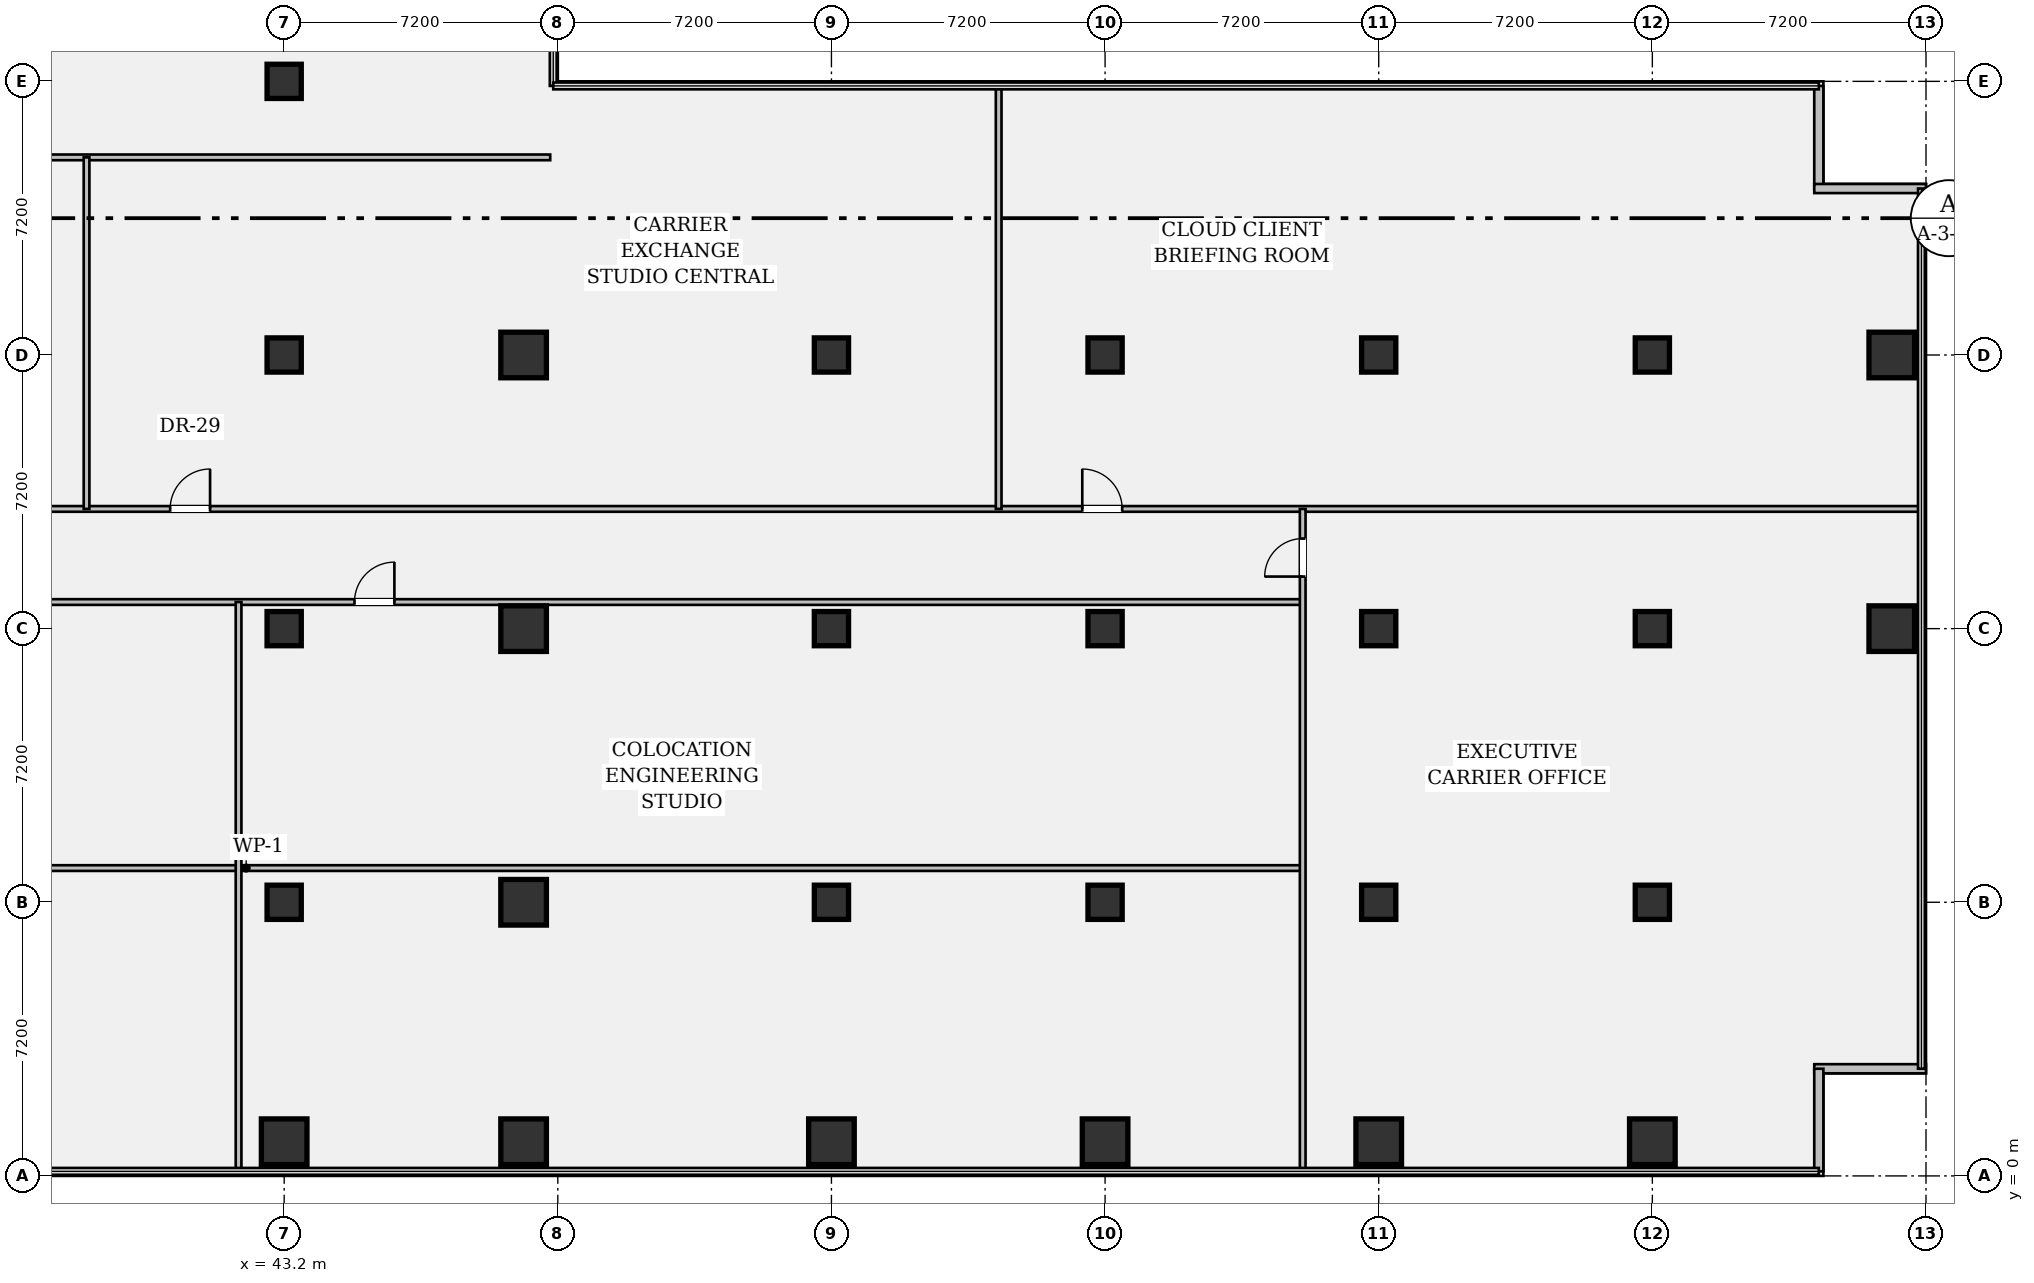
"""IFC4 building model, lengths in metres.
Left out: names, types, materials, properties, quantities, classifications, styles, units other than length and angle.
Written with IfcOpenShell. Run it as: python <this file> out.ifc"""

import sys

from ifc_helpers import new_model, si_unit, direction, frame, frame_2d, origin, origin_2d, place, context, subcontext, project, spatial, rectangle, hollow_rectangle, extrude, element, fill, save


model = new_model("IFC4")
c1 = context("Model", 3, precision=1e-05, world=origin(), true_north=direction((0.0, 1.0)))
c2 = subcontext(c1, "Body", "Model", "MODEL_VIEW")
j1 = project(units=[si_unit("LENGTHUNIT", "METRE"), si_unit("PLANEANGLEUNIT", "RADIAN")], contexts=[c1])
p1 = place(None, origin())
s1 = spatial("IfcSite", under=j1, at=p1, CompositionType="ELEMENT")
p2 = place(p1, origin())
s2 = spatial("IfcBuilding", under=s1, at=p2, CompositionType="ELEMENT")
p3 = place(p2, frame((0.0, 0.0, 13.65)))
s3 = spatial("IfcBuildingStorey", under=s2, at=p3, CompositionType="ELEMENT", Elevation=13.65)
p4 = place(p3, frame((43.2, 0.9, 0.0), z_axis=(0.0, 0.0, 1.0), x_axis=(1.0, 0.0, 0.0)))
e1 = element("IfcColumn", 1, at=p4, inside=s3, PredefinedType="COLUMN", context=c2, shape_type="SweptSolid", body=[
    extrude(hollow_rectangle(XDim=1.2, YDim=1.2, WallThickness=0.075, at=origin_2d()), origin(), (0.0, 0.0, 1.0), 3.91),
])
for number, where, z_axis, x_axis in (
    (2, (43.2, 7.2, 0.0), (0.0, 0.0, 1.0), (1.0, 0.0, 0.0)),
    (3, (43.2, 14.4, 0.0), (0.0, 0.0, 1.0), (1.0, 0.0, 0.0)),
    (4, (43.2, 21.6, 0.0), (0.0, 0.0, 1.0), (1.0, 0.0, 0.0)),
    (5, (43.2, 28.8, 0.0), (0.0, 0.0, 1.0), (1.0, 0.0, 0.0)),
):
    element("IfcColumn", number, at=place(p3, frame(where, z_axis=z_axis, x_axis=x_axis)), inside=s3, PredefinedType="COLUMN", context=c2, shape_type="SweptSolid", body=[
        extrude(rectangle(XDim=0.9, YDim=0.9, at=origin_2d()), origin(), (0.0, 0.0, 1.0), 3.91),
    ])
for number, where, z_axis, x_axis in (
    (6, (49.5, 0.9, 0.0), (0.0, 0.0, 1.0), (1.0, 0.0, 0.0)),
    (7, (49.5, 7.2, 0.0), (0.0, 0.0, 1.0), (1.0, 0.0, 0.0)),
    (8, (49.5, 14.4, 0.0), (0.0, 0.0, 1.0), (1.0, 0.0, 0.0)),
    (9, (49.5, 21.6, 0.0), (0.0, 0.0, 1.0), (1.0, 0.0, 0.0)),
    (10, (57.6, 0.9, 0.0), (0.0, 0.0, 1.0), (1.0, 0.0, 0.0)),
):
    element("IfcColumn", number, at=place(p3, frame(where, z_axis=z_axis, x_axis=x_axis)), inside=s3, PredefinedType="COLUMN", context=c2, shape_type="SweptSolid", body=[
        extrude(hollow_rectangle(XDim=1.2, YDim=1.2, WallThickness=0.075, at=origin_2d()), origin(), (0.0, 0.0, 1.0), 3.91),
    ])
for number, where, z_axis, x_axis in (
    (11, (57.6, 7.2, 0.0), (0.0, 0.0, 1.0), (1.0, 0.0, 0.0)),
    (12, (57.6, 14.4, 0.0), (0.0, 0.0, 1.0), (1.0, 0.0, 0.0)),
    (13, (57.6, 21.6, 0.0), (0.0, 0.0, 1.0), (1.0, 0.0, 0.0)),
):
    element("IfcColumn", number, at=place(p3, frame(where, z_axis=z_axis, x_axis=x_axis)), inside=s3, PredefinedType="COLUMN", context=c2, shape_type="SweptSolid", body=[
        extrude(rectangle(XDim=0.9, YDim=0.9, at=origin_2d()), origin(), (0.0, 0.0, 1.0), 3.91),
    ])
p5 = place(p3, frame((64.8, 0.9, 0.0), z_axis=(0.0, 0.0, 1.0), x_axis=(1.0, 0.0, 0.0)))
e14 = element("IfcColumn", 14, at=p5, inside=s3, PredefinedType="COLUMN", context=c2, shape_type="SweptSolid", body=[
    extrude(hollow_rectangle(XDim=1.2, YDim=1.2, WallThickness=0.075, at=origin_2d()), origin(), (0.0, 0.0, 1.0), 3.91),
])
for number, where, z_axis, x_axis in (
    (15, (64.8, 7.2, 0.0), (0.0, 0.0, 1.0), (1.0, 0.0, 0.0)),
    (16, (64.8, 14.4, 0.0), (0.0, 0.0, 1.0), (1.0, 0.0, 0.0)),
    (17, (64.8, 21.6, 0.0), (0.0, 0.0, 1.0), (1.0, 0.0, 0.0)),
):
    element("IfcColumn", number, at=place(p3, frame(where, z_axis=z_axis, x_axis=x_axis)), inside=s3, PredefinedType="COLUMN", context=c2, shape_type="SweptSolid", body=[
        extrude(rectangle(XDim=0.9, YDim=0.9, at=origin_2d()), origin(), (0.0, 0.0, 1.0), 3.91),
    ])
p6 = place(p3, frame((72.0, 0.9, 0.0), z_axis=(0.0, 0.0, 1.0), x_axis=(1.0, 0.0, 0.0)))
e18 = element("IfcColumn", 18, at=p6, inside=s3, PredefinedType="COLUMN", context=c2, shape_type="SweptSolid", body=[
    extrude(hollow_rectangle(XDim=1.2, YDim=1.2, WallThickness=0.075, at=origin_2d()), origin(), (0.0, 0.0, 1.0), 3.91),
])
for number, where, z_axis, x_axis in (
    (19, (72.0, 7.2, 0.0), (0.0, 0.0, 1.0), (1.0, 0.0, 0.0)),
    (20, (72.0, 14.4, 0.0), (0.0, 0.0, 1.0), (1.0, 0.0, 0.0)),
    (21, (72.0, 21.6, 0.0), (0.0, 0.0, 1.0), (1.0, 0.0, 0.0)),
):
    element("IfcColumn", number, at=place(p3, frame(where, z_axis=z_axis, x_axis=x_axis)), inside=s3, PredefinedType="COLUMN", context=c2, shape_type="SweptSolid", body=[
        extrude(rectangle(XDim=0.9, YDim=0.9, at=origin_2d()), origin(), (0.0, 0.0, 1.0), 3.91),
    ])
p7 = place(p3, frame((79.2, 0.9, 0.0), z_axis=(0.0, 0.0, 1.0), x_axis=(1.0, 0.0, 0.0)))
e22 = element("IfcColumn", 22, at=p7, inside=s3, PredefinedType="COLUMN", context=c2, shape_type="SweptSolid", body=[
    extrude(hollow_rectangle(XDim=1.2, YDim=1.2, WallThickness=0.075, at=origin_2d()), origin(), (0.0, 0.0, 1.0), 3.91),
])
for number, where, z_axis, x_axis in (
    (23, (79.2, 7.2, 0.0), (0.0, 0.0, 1.0), (1.0, 0.0, 0.0)),
    (24, (79.2, 14.4, 0.0), (0.0, 0.0, 1.0), (1.0, 0.0, 0.0)),
    (25, (79.2, 21.6, 0.0), (0.0, 0.0, 1.0), (1.0, 0.0, 0.0)),
):
    element("IfcColumn", number, at=place(p3, frame(where, z_axis=z_axis, x_axis=x_axis)), inside=s3, PredefinedType="COLUMN", context=c2, shape_type="SweptSolid", body=[
        extrude(rectangle(XDim=0.9, YDim=0.9, at=origin_2d()), origin(), (0.0, 0.0, 1.0), 3.91),
    ])
for number, where, z_axis, x_axis in (
    (26, (85.5, 14.4, 0.0), (0.0, 0.0, 1.0), (1.0, 0.0, 0.0)),
    (27, (85.5, 21.6, 0.0), (0.0, 0.0, 1.0), (1.0, 0.0, 0.0)),
):
    element("IfcColumn", number, at=place(p3, frame(where, z_axis=z_axis, x_axis=x_axis)), inside=s3, PredefinedType="COLUMN", context=c2, shape_type="SweptSolid", body=[
        extrude(hollow_rectangle(XDim=1.2, YDim=1.2, WallThickness=0.075, at=origin_2d()), origin(), (0.0, 0.0, 1.0), 3.91),
    ])
p8 = place(p3, frame((83.58, 28.68, 0.0), z_axis=(0.0, 0.0, 1.0), x_axis=(0.0, -1.0, 0.0)))
e28 = element("IfcWall", 28, at=p8, inside=s3, PredefinedType="STANDARD", context=c2, shape_type="SweptSolid", body=[
    extrude(rectangle(XDim=2.7, YDim=0.24, at=frame_2d((1.35, 0.0))), origin(), (0.0, 0.0, 1.0), 3.91),
])
for number, where, z_axis, x_axis in (
    (29, (83.46, 25.98, 0.0), (0.0, 0.0, 1.0), (1.0, 0.0, 0.0)),
    (30, (86.4, 2.82, 0.0), (0.0, 0.0, 1.0), (-1.0, 0.0, 0.0)),
):
    element("IfcWall", number, at=place(p3, frame(where, z_axis=z_axis, x_axis=x_axis)), inside=s3, PredefinedType="STANDARD", context=c2, shape_type="SweptSolid", body=[
        extrude(rectangle(XDim=2.94, YDim=0.24, at=frame_2d((1.47, 0.0))), origin(), (0.0, 0.0, 1.0), 3.91),
    ])
p9 = place(p3, frame((83.58, 2.82, 0.0), z_axis=(0.0, 0.0, 1.0), x_axis=(0.0, -1.0, 0.0)))
e31 = element("IfcWall", 31, at=p9, inside=s3, PredefinedType="STANDARD", context=c2, shape_type="SweptSolid", body=[
    extrude(rectangle(XDim=2.7, YDim=0.24, at=frame_2d((1.35, 0.0))), origin(), (0.0, 0.0, 1.0), 3.91),
])
p10 = place(p3, frame((14.4, 8.1, 0.0), z_axis=(0.0, 0.0, 1.0), x_axis=(1.0, 0.0, 0.0)))
e32 = element("IfcWall", 32, at=p10, inside=s3, PredefinedType="PARTITIONING", context=c2, shape_type="SweptSolid", body=[
    extrude(rectangle(XDim=55.6, YDim=0.15, at=frame_2d((27.8, 0.0))), origin(), (0.0, 0.0, 1.0), 2.968),
])
p11 = place(p10, frame((1.1, 0.0, 0.0)))
e33 = element("IfcOpeningElement", 33, at=p11, cuts=e32, PredefinedType="OPENING", context=c2, shape_type="SweptSolid", body=[
    extrude(rectangle(XDim=1.0, YDim=2.15, at=frame_2d((0.5, 1.075))), frame((0.0, 0.087, 0.0), z_axis=(0.0, -1.0, 0.0), x_axis=(1.0, 0.0, 0.0)), (0.0, 0.0, 1.0), 0.174),
])
p12 = place(p3, frame((17.45, 15.1, 0.0), z_axis=(0.0, 0.0, 1.0), x_axis=(1.0, 0.0, 0.0)))
e34 = element("IfcWall", 34, at=p12, inside=s3, PredefinedType="PARTITIONING", context=c2, shape_type="SweptSolid", body=[
    extrude(rectangle(XDim=52.55, YDim=0.15, at=frame_2d((26.275, 0.0))), origin(), (0.0, 0.0, 1.0), 2.968),
])
p13 = place(p12, frame((5.2, 0.0, 0.0)))
e35 = element("IfcOpeningElement", 35, at=p13, cuts=e34, PredefinedType="OPENING", context=c2, shape_type="SweptSolid", body=[
    extrude(rectangle(XDim=1.05, YDim=2.15, at=frame_2d((0.525, 1.075))), frame((0.0, 0.087, 0.0), z_axis=(0.0, -1.0, 0.0), x_axis=(1.0, 0.0, 0.0)), (0.0, 0.0, 1.0), 0.174),
])
p14 = place(p12, frame((27.6, 0.0, 0.0)))
e36 = element("IfcOpeningElement", 36, at=p14, cuts=e34, PredefinedType="OPENING", context=c2, shape_type="SweptSolid", body=[
    extrude(rectangle(XDim=1.05, YDim=2.15, at=frame_2d((0.525, 1.075))), frame((0.0, 0.087, 0.0), z_axis=(0.0, -1.0, 0.0), x_axis=(1.0, 0.0, 0.0)), (0.0, 0.0, 1.0), 0.174),
])
p15 = place(p3, frame((17.45, 17.55, 0.0), z_axis=(0.0, 0.0, 1.0), x_axis=(1.0, 0.0, 0.0)))
e37 = element("IfcWall", 37, at=p15, inside=s3, PredefinedType="PARTITIONING", context=c2, shape_type="SweptSolid", body=[
    extrude(rectangle(XDim=68.83, YDim=0.15, at=frame_2d((34.415, 0.0))), origin(), (0.0, 0.0, 1.0), 2.968),
])
p16 = place(p15, frame((2.4, 0.0, 0.0)))
e38 = element("IfcOpeningElement", 38, at=p16, cuts=e37, PredefinedType="OPENING", context=c2, shape_type="SweptSolid", body=[
    extrude(rectangle(XDim=1.05, YDim=2.15, at=frame_2d((0.525, 1.075))), frame((0.0, 0.087, 0.0), z_axis=(0.0, -1.0, 0.0), x_axis=(1.0, 0.0, 0.0)), (0.0, 0.0, 1.0), 0.174),
])
p17 = place(p15, frame((22.75, 0.0, 0.0)))
e39 = element("IfcOpeningElement", 39, at=p17, cuts=e37, PredefinedType="OPENING", context=c2, shape_type="SweptSolid", body=[
    extrude(rectangle(XDim=1.05, YDim=2.15, at=frame_2d((0.525, 1.075))), frame((0.0, 0.087, 0.0), z_axis=(0.0, -1.0, 0.0), x_axis=(1.0, 0.0, 0.0)), (0.0, 0.0, 1.0), 0.174),
])
p18 = place(p15, frame((46.75, 0.0, 0.0)))
e40 = element("IfcOpeningElement", 40, at=p18, cuts=e37, PredefinedType="OPENING", context=c2, shape_type="SweptSolid", body=[
    extrude(rectangle(XDim=1.05, YDim=2.15, at=frame_2d((0.525, 1.075))), frame((0.0, 0.087, 0.0), z_axis=(0.0, -1.0, 0.0), x_axis=(1.0, 0.0, 0.0)), (0.0, 0.0, 1.0), 0.174),
])
p19 = place(p3, frame((70.0, 0.12, 0.0), z_axis=(0.0, 0.0, 1.0), x_axis=(0.0, 1.0, 0.0)))
e41 = element("IfcWall", 41, at=p19, inside=s3, PredefinedType="PARTITIONING", context=c2, shape_type="SweptSolid", body=[
    extrude(rectangle(XDim=17.43, YDim=0.15, at=frame_2d((8.715, 0.0))), origin(), (0.0, 0.0, 1.0), 2.968),
])
p20 = place(p19, frame((15.65, 0.0, 0.0)))
e42 = element("IfcOpeningElement", 42, at=p20, cuts=e41, PredefinedType="OPENING", context=c2, shape_type="SweptSolid", body=[
    extrude(rectangle(XDim=1.0, YDim=2.15, at=frame_2d((0.5, 1.075))), frame((0.0, 0.087, 0.0), z_axis=(0.0, -1.0, 0.0), x_axis=(1.0, 0.0, 0.0)), (0.0, 0.0, 1.0), 0.174),
])
p21 = place(p3, frame((17.45, 26.8, 0.0), z_axis=(0.0, 0.0, 1.0), x_axis=(1.0, 0.0, 0.0)))
e43 = element("IfcWall", 43, at=p21, inside=s3, PredefinedType="PARTITIONING", context=c2, shape_type="SweptSolid", body=[
    extrude(rectangle(XDim=32.75, YDim=0.15, at=frame_2d((16.375, 0.0))), origin(), (0.0, 0.0, 1.0), 2.968),
])
p22 = place(p3, frame((38.0, 17.55, 0.0), z_axis=(0.0, 0.0, 1.0), x_axis=(0.0, 1.0, 0.0)))
e44 = element("IfcWall", 44, at=p22, inside=s3, PredefinedType="PARTITIONING", context=c2, shape_type="SweptSolid", body=[
    extrude(rectangle(XDim=9.25, YDim=0.15, at=frame_2d((4.625, 0.0))), origin(), (0.0, 0.0, 1.0), 2.968),
])
p23 = place(p3, frame((62.0, 17.55, 0.0), z_axis=(0.0, 0.0, 1.0), x_axis=(0.0, 1.0, 0.0)))
e45 = element("IfcWall", 45, at=p23, inside=s3, PredefinedType="PARTITIONING", context=c2, shape_type="SweptSolid", body=[
    extrude(rectangle(XDim=11.15, YDim=0.15, at=frame_2d((5.575, 0.0))), origin(), (0.0, 0.0, 1.0), 2.968),
])
p24 = place(p3, frame((42.0, 0.12, 0.0), z_axis=(0.0, 0.0, 1.0), x_axis=(0.0, 1.0, 0.0)))
e46 = element("IfcWall", 46, at=p24, inside=s3, PredefinedType="PARTITIONING", context=c2, shape_type="SweptSolid", body=[
    extrude(rectangle(XDim=14.98, YDim=0.15, at=frame_2d((7.49, 0.0))), origin(), (0.0, 0.0, 1.0), 2.968),
])
p25 = place(p17, origin())
e47 = element("IfcDoor", 47, at=p25, inside=s3, OperationType="SINGLE_SWING_RIGHT", PredefinedType="DOOR", context=c2, shape_type="SweptSolid", body=[
    extrude(rectangle(XDim=1.05, YDim=2.15, at=frame_2d((0.525, 1.075))), frame((0.0, 0.025, 0.0), z_axis=(0.0, -1.0, 0.0), x_axis=(1.0, 0.0, 0.0)), (0.0, 0.0, 1.0), 0.05),
])
fill(e39, e47)
p26 = place(p18, origin())
e48 = element("IfcDoor", 48, at=p26, inside=s3, OperationType="SINGLE_SWING_LEFT", PredefinedType="DOOR", context=c2, shape_type="SweptSolid", body=[
    extrude(rectangle(XDim=1.05, YDim=2.15, at=frame_2d((0.525, 1.075))), frame((0.0, 0.025, 0.0), z_axis=(0.0, -1.0, 0.0), x_axis=(1.0, 0.0, 0.0)), (0.0, 0.0, 1.0), 0.05),
])
fill(e40, e48)
p27 = place(p14, origin())
e49 = element("IfcDoor", 49, at=p27, inside=s3, OperationType="SINGLE_SWING_RIGHT", PredefinedType="DOOR", context=c2, shape_type="SweptSolid", body=[
    extrude(rectangle(XDim=1.05, YDim=2.15, at=frame_2d((0.525, 1.075))), frame((0.0, 0.025, 0.0), z_axis=(0.0, -1.0, 0.0), x_axis=(1.0, 0.0, 0.0)), (0.0, 0.0, 1.0), 0.05),
])
fill(e36, e49)
p28 = place(p20, origin())
e50 = element("IfcDoor", 50, at=p28, inside=s3, OperationType="SINGLE_SWING_LEFT", PredefinedType="DOOR", context=c2, shape_type="SweptSolid", body=[
    extrude(rectangle(XDim=1.0, YDim=2.15, at=frame_2d((0.5, 1.075))), frame((0.0, 0.025, 0.0), z_axis=(0.0, -1.0, 0.0), x_axis=(1.0, 0.0, 0.0)), (0.0, 0.0, 1.0), 0.05),
])
fill(e42, e50)
save(model, sys.argv[1])
